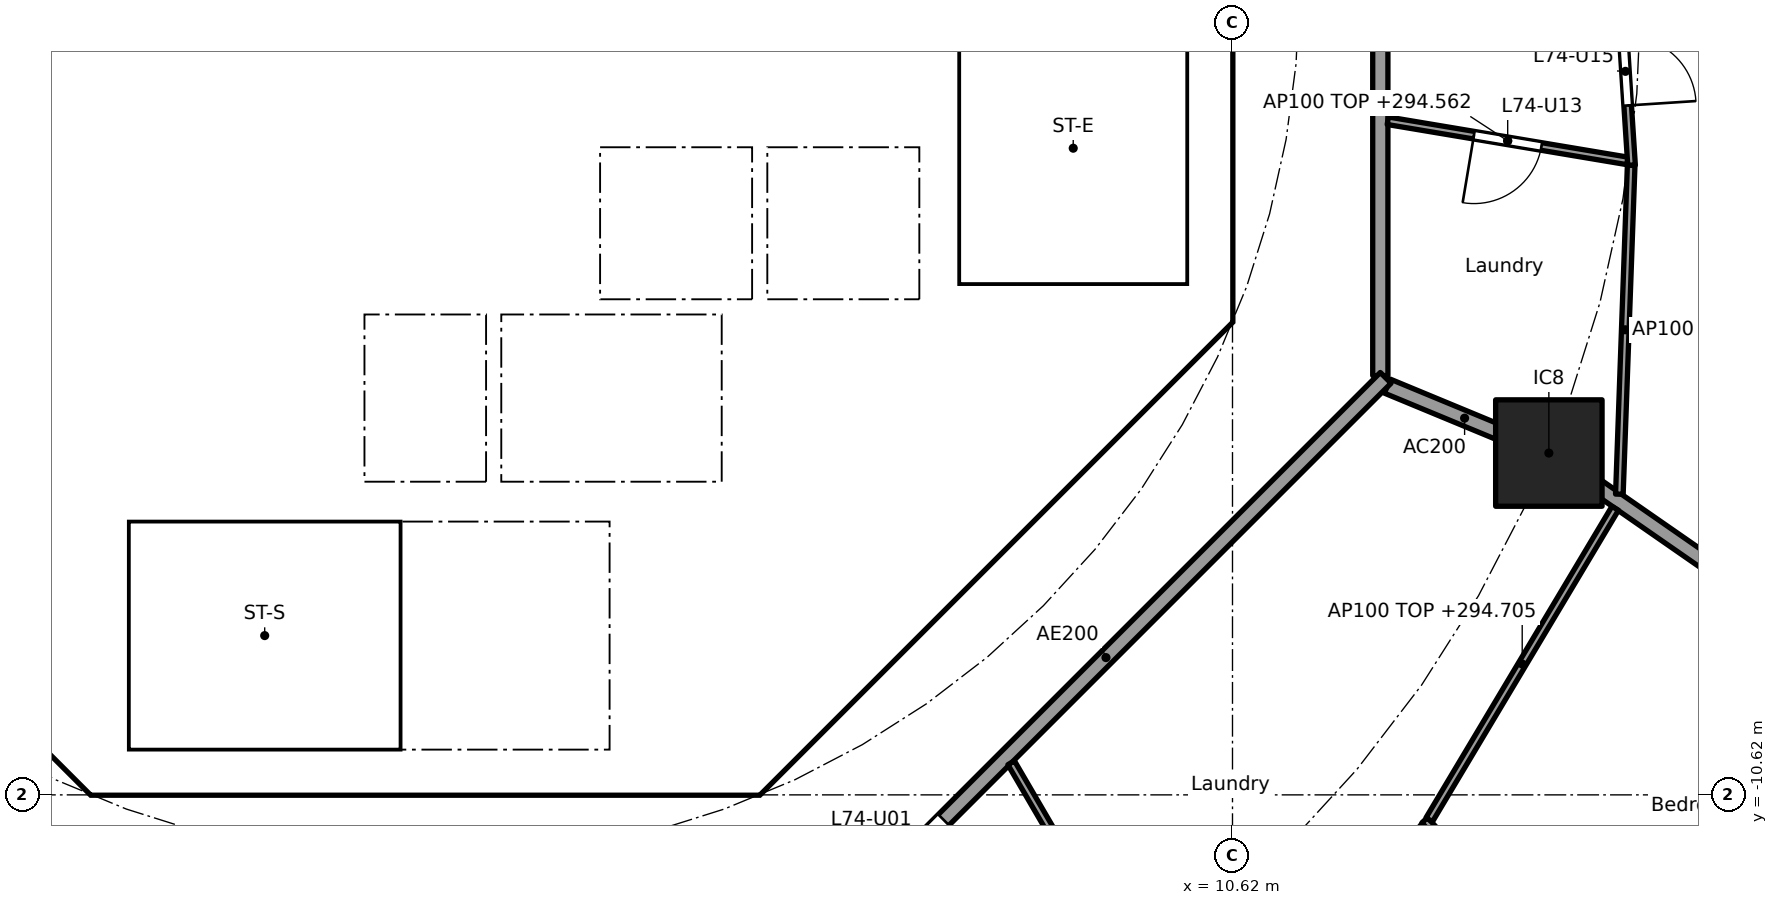
"""IFC4 building model, lengths in metres.
Left out: names, types, materials, properties, quantities, classifications, styles, units other than length and angle.
Written with IfcOpenShell. Run it as: python <this file> out.ifc"""

import sys

from ifc_helpers import new_model, si_unit, direction, frame, frame_2d, origin, origin_2d, place, context, subcontext, project, spatial, polyline, rectangle, outline, extrude, element, fill, save


model = new_model("IFC4")
c1 = context("Model", 3, precision=1e-05, world=origin(), true_north=direction((0.0, 1.0)))
c2 = subcontext(c1, "Body", "Model", "MODEL_VIEW")
j1 = project(units=[si_unit("LENGTHUNIT", "METRE"), si_unit("PLANEANGLEUNIT", "RADIAN")], contexts=[c1])
p1 = place(None, origin())
s1 = spatial("IfcSite", under=j1, at=p1, CompositionType="ELEMENT")
p2 = place(p1, origin())
s2 = spatial("IfcBuilding", under=s1, at=p2, CompositionType="ELEMENT")
p3 = place(p2, frame((0.0, 0.0, 291.8)))
s3 = spatial("IfcBuildingStorey", under=s2, at=p3, CompositionType="ELEMENT", Elevation=291.8)
p4 = place(p3, frame((14.782, -6.123, 0.0), z_axis=(0.0, 0.0, 1.0), x_axis=(1.0, 0.0, 0.0)))
e1 = element("IfcColumn", 1, at=p4, inside=s3, PredefinedType="COLUMN", context=c2, shape_type="SweptSolid", body=[
    extrude(rectangle(XDim=1.4, YDim=1.4, at=origin_2d()), origin(), (0.0, 0.0, 1.0), 3.7),
])
p5 = place(p3, frame((-9.988, -4.613, 0.0), z_axis=(0.0, 0.0, 1.0), x_axis=(0.707106781187, -0.707106781187, 0.0)))
e2 = element("IfcWall", 2, at=p5, inside=s3, PredefinedType="SHEAR", context=c2, shape_type="SweptSolid", body=[
    extrude(rectangle(XDim=7.602, YDim=0.6, at=frame_2d((3.801, 0.0))), origin(), (0.0, 0.0, 1.0), 3.44),
])
p6 = place(p5, frame((6.151, 0.0, 0.0)))
e3 = element("IfcOpeningElement", 3, at=p6, cuts=e2, PredefinedType="OPENING", context=c2, shape_type="SweptSolid", body=[
    extrude(rectangle(XDim=1.1, YDim=2.1, at=frame_2d((0.55, 1.05))), frame((0.0, 0.31, 0.0), z_axis=(0.0, -1.0, 0.0), x_axis=(1.0, 0.0, 0.0)), (0.0, 0.0, 1.0), 0.62),
])
p7 = place(p3, frame((4.613, -9.988, 0.0), z_axis=(0.0, 0.0, 1.0), x_axis=(0.707106781187, 0.707106781187, 0.0)))
e4 = element("IfcWall", 4, at=p7, inside=s3, PredefinedType="SHEAR", context=c2, shape_type="SweptSolid", body=[
    extrude(rectangle(XDim=7.602, YDim=0.6, at=frame_2d((3.801, 0.0))), origin(), (0.0, 0.0, 1.0), 3.44),
])
p8 = place(p7, frame((3.201, 0.0, 0.0)))
e5 = element("IfcOpeningElement", 5, at=p8, cuts=e4, PredefinedType="OPENING", context=c2, shape_type="SweptSolid", body=[
    extrude(rectangle(XDim=1.2, YDim=2.1, at=frame_2d((0.6, 1.05))), frame((0.0, 0.31, 0.0), z_axis=(0.0, -1.0, 0.0), x_axis=(1.0, 0.0, 0.0)), (0.0, 0.0, 1.0), 0.62),
])
p9 = place(p3, frame((4.0, -10.025, 0.0), z_axis=(0.0, 0.0, 1.0), x_axis=(0.0, 1.0, 0.0)))
e6 = element("IfcWall", 6, at=p9, inside=s3, PredefinedType="SOLIDWALL", context=c2, shape_type="SweptSolid", body=[
    extrude(rectangle(XDim=3.0, YDim=0.2, at=frame_2d((1.5, 0.0))), origin(), (0.0, 0.0, 1.0), 3.44),
])
p10 = place(p9, frame((0.975, 0.0, 0.0)))
e7 = element("IfcOpeningElement", 7, at=p10, cuts=e6, PredefinedType="OPENING", context=c2, shape_type="SweptSolid", body=[
    extrude(rectangle(XDim=1.1, YDim=2.1, at=frame_2d((0.55, 1.05))), frame((0.0, 0.11, 0.0), z_axis=(0.0, -1.0, 0.0), x_axis=(1.0, 0.0, 0.0)), (0.0, 0.0, 1.0), 0.22),
])
p11 = place(p3, frame((4.0, -6.5, 0.0), z_axis=(0.0, 0.0, 1.0), x_axis=(0.0, 1.0, 0.0)))
e8 = element("IfcWall", 8, at=p11, inside=s3, PredefinedType="SOLIDWALL", context=c2, shape_type="SweptSolid", body=[
    extrude(rectangle(XDim=2.2, YDim=0.2, at=frame_2d((1.1, 0.0))), origin(), (0.0, 0.0, 1.0), 3.44),
])
p12 = place(p11, frame((0.55, 0.0, 0.0)))
e9 = element("IfcOpeningElement", 9, at=p12, cuts=e8, PredefinedType="OPENING", context=c2, shape_type="SweptSolid", body=[
    extrude(rectangle(XDim=1.1, YDim=2.1, at=frame_2d((0.55, 1.05))), frame((0.0, 0.11, 0.0), z_axis=(0.0, -1.0, 0.0), x_axis=(1.0, 0.0, 0.0)), (0.0, 0.0, 1.0), 0.22),
])
p13 = place(p3, frame((-4.0, -6.5, 0.0), z_axis=(0.0, 0.0, 1.0), x_axis=(0.0, 1.0, 0.0)))
e10 = element("IfcWall", 10, at=p13, inside=s3, PredefinedType="SOLIDWALL", context=c2, shape_type="SweptSolid", body=[
    extrude(rectangle(XDim=2.2, YDim=0.2, at=frame_2d((1.1, 0.0))), origin(), (0.0, 0.0, 1.0), 3.44),
])
p14 = place(p13, frame((0.65, 0.0, 0.0)))
e11 = element("IfcOpeningElement", 11, at=p14, cuts=e10, PredefinedType="OPENING", context=c2, shape_type="SweptSolid", body=[
    extrude(rectangle(XDim=0.9, YDim=2.1, at=frame_2d((0.45, 1.05))), frame((0.0, 0.11, 0.0), z_axis=(0.0, -1.0, 0.0), x_axis=(1.0, 0.0, 0.0)), (0.0, 0.0, 1.0), 0.22),
])
p15 = place(p3, frame((-6.7, -2.0, 0.0), z_axis=(0.0, 0.0, 1.0), x_axis=(1.0, 0.0, 0.0)))
e12 = element("IfcWall", 12, at=p15, inside=s3, PredefinedType="SOLIDWALL", context=c2, shape_type="SweptSolid", body=[
    extrude(rectangle(XDim=13.4, YDim=0.2, at=frame_2d((6.7, 0.0))), origin(), (0.0, 0.0, 1.0), 3.44),
])
p16 = place(p15, frame((9.45, 0.0, 0.0)))
e13 = element("IfcOpeningElement", 13, at=p16, cuts=e12, PredefinedType="OPENING", context=c2, shape_type="SweptSolid", body=[
    extrude(rectangle(XDim=1.1, YDim=2.1, at=frame_2d((0.55, 1.05))), frame((0.0, 0.11, 0.0), z_axis=(0.0, -1.0, 0.0), x_axis=(1.0, 0.0, 0.0)), (0.0, 0.0, 1.0), 0.22),
])
p17 = place(p15, frame((11.65, 0.0, 0.0)))
e14 = element("IfcOpeningElement", 14, at=p17, cuts=e12, PredefinedType="OPENING", context=c2, shape_type="SweptSolid", body=[
    extrude(rectangle(XDim=1.1, YDim=2.1, at=frame_2d((0.55, 1.05))), frame((0.0, 0.11, 0.0), z_axis=(0.0, -1.0, 0.0), x_axis=(1.0, 0.0, 0.0)), (0.0, 0.0, 1.0), 0.22),
])
p18 = place(p15, frame((0.75, 0.0, 0.0)))
e15 = element("IfcOpeningElement", 15, at=p18, cuts=e12, PredefinedType="OPENING", context=c2, shape_type="SweptSolid", body=[
    extrude(rectangle(XDim=0.9, YDim=2.1, at=frame_2d((0.45, 1.05))), frame((0.0, 0.11, 0.0), z_axis=(0.0, -1.0, 0.0), x_axis=(1.0, 0.0, 0.0)), (0.0, 0.0, 1.0), 0.22),
])
p19 = place(p15, frame((2.95, 0.0, 0.0)))
e16 = element("IfcOpeningElement", 16, at=p19, cuts=e12, PredefinedType="OPENING", context=c2, shape_type="SweptSolid", body=[
    extrude(rectangle(XDim=0.9, YDim=2.1, at=frame_2d((0.45, 1.05))), frame((0.0, 0.11, 0.0), z_axis=(0.0, -1.0, 0.0), x_axis=(1.0, 0.0, 0.0)), (0.0, 0.0, 1.0), 0.22),
])
p20 = place(p15, frame((6.25, 0.0, 0.0)))
e17 = element("IfcOpeningElement", 17, at=p20, cuts=e12, PredefinedType="OPENING", context=c2, shape_type="SweptSolid", body=[
    extrude(rectangle(XDim=0.9, YDim=2.1, at=frame_2d((0.45, 1.05))), frame((0.0, 0.11, 0.0), z_axis=(0.0, -1.0, 0.0), x_axis=(1.0, 0.0, 0.0)), (0.0, 0.0, 1.0), 0.22),
])
p21 = place(p3, origin())
e18 = element("IfcWall", 18, at=p21, inside=s3, PredefinedType="SHEAR", context=c2, shape_type="SweptSolid", body=[
    extrude(outline(polyline([(-4.152, -10.025), (4.152, -10.025), (4.401, -9.776), (4.825, -10.2), (4.401, -10.625), (-4.401, -10.625), (-4.825, -10.2), (-4.401, -9.776), (-4.152, -10.025)])), origin(), (0.0, 0.0, 1.0), 3.44),
])
p22 = place(p3, origin())
e19 = element("IfcWall", 19, at=p22, inside=s3, PredefinedType="SHEAR", context=c2, shape_type="SweptSolid", body=[
    extrude(outline(polyline([(9.776, -4.401), (10.025, -4.152), (10.025, -3.801), (10.025, 4.152), (9.776, 4.401), (10.2, 4.825), (10.625, 4.401), (10.625, -4.401), (10.2, -4.825), (9.776, -4.401)])), origin(), (0.0, 0.0, 1.0), 3.44),
])
for number, where, z_axis, x_axis in (
    (20, (-0.9, -6.5, 0.0), (0.0, 0.0, 1.0), (0.0, 1.0, 0.0)),
    (21, (0.9, -6.5, 0.0), (0.0, 0.0, 1.0), (0.0, 1.0, 0.0)),
):
    element("IfcWall", number, at=place(p3, frame(where, z_axis=z_axis, x_axis=x_axis)), inside=s3, PredefinedType="SOLIDWALL", context=c2, shape_type="SweptSolid", body=[
        extrude(rectangle(XDim=2.2, YDim=0.2, at=frame_2d((1.1, 0.0))), origin(), (0.0, 0.0, 1.0), 3.44),
    ])
p23 = place(p3, origin())
e22 = element("IfcWall", 22, at=p23, inside=s3, PredefinedType="SOLIDWALL", context=c2, shape_type="SweptSolid", body=[
    extrude(outline(polyline([(-6.7, -2.1), (-6.5, -2.1), (-6.5, -4.1), (-4.5, -4.1), (-4.5, -2.1), (-4.3, -2.1), (-4.3, -4.1), (-2.3, -4.1), (-2.3, -2.1), (-2.1, -2.1), (-2.1, -4.1), (2.1, -4.1), (2.1, -2.1), (2.3, -2.1), (2.3, -4.1), (4.3, -4.1), (4.3, -2.1), (4.5, -2.1), (4.5, -4.1), (6.5, -4.1), (6.5, -2.1), (6.7, -2.1), (6.7, -4.3), (-6.7, -4.3), (-6.7, -2.1)])), origin(), (0.0, 0.0, 1.0), 3.44),
])
p24 = place(p3, origin())
e23 = element("IfcWall", 23, at=p24, inside=s3, PredefinedType="SOLIDWALL", context=c2, shape_type="SweptSolid", body=[
    extrude(outline(polyline([(-3.9, -10.025), (-4.1, -10.025), (-4.1, -7.025), (-3.9, -7.025), (-3.9, -10.025)])), origin(), (0.0, 0.0, 1.0), 3.44),
])
p25 = place(p3, origin())
e24 = element("IfcWall", 24, at=p25, inside=s3, PredefinedType="SOLIDWALL", context=c2, shape_type="SweptSolid", body=[
    extrude(outline(polyline([(4.1, -7.025), (-4.1, -7.025), (-4.1, -6.5), (4.1, -6.5), (4.1, -7.025)])), origin(), (0.0, 0.0, 1.0), 3.44),
])
p26 = place(p3, origin())
e25 = element("IfcWall", 25, at=p26, inside=s3, PredefinedType="SOLIDWALL", context=c2, shape_type="SweptSolid", body=[
    extrude(outline(polyline([(7.025, -3.9), (6.7, -3.9), (6.7, 3.9), (7.025, 3.9), (7.025, -3.9)])), origin(), (0.0, 0.0, 1.0), 3.44),
])
p27 = place(p3, origin())
e26 = element("IfcWall", 26, at=p27, inside=s3, PredefinedType="SOLIDWALL", context=c2, shape_type="SweptSolid", body=[
    extrude(outline(polyline([(10.025, -4.1), (6.7, -4.1), (6.7, -3.9), (10.025, -3.9), (10.025, -4.1)])), origin(), (0.0, 0.0, 1.0), 3.44),
])
p28 = place(p3, frame((12.657, -5.243, 0.0), z_axis=(0.0, 0.0, 1.0), x_axis=(0.92383017907, -0.382802560388, 0.0)))
e27 = element("IfcWall", 27, at=p28, inside=s3, PredefinedType="PARTITIONING", context=c2, shape_type="SweptSolid", body=[
    extrude(rectangle(XDim=2.2, YDim=0.2, at=frame_2d((1.1, 0.0))), origin(), (0.0, 0.0, 1.0), 3.44),
])
p29 = place(p3, frame((14.823, -6.151, 0.0), z_axis=(0.0, 0.0, 1.0), x_axis=(0.821435065081, -0.570302054928, 0.0)))
e28 = element("IfcWall", 28, at=p29, inside=s3, PredefinedType="PARTITIONING", context=c2, shape_type="SweptSolid", body=[
    extrude(rectangle(XDim=5.368, YDim=0.2, at=frame_2d((2.684, 0.0))), origin(), (0.0, 0.0, 1.0), 3.44),
])
p30 = place(p3, frame((12.565, -5.104, 0.0), z_axis=(0.0, 0.0, 1.0), x_axis=(0.0, 1.0, 0.0)))
e29 = element("IfcWall", 29, at=p30, inside=s3, PredefinedType="PARTITIONING", context=c2, shape_type="SweptSolid", body=[
    extrude(rectangle(XDim=10.209, YDim=0.2, at=frame_2d((5.104, 0.0))), origin(), (0.0, 0.0, 1.0), 3.44),
])
p31 = place(p30, frame((4.604, 0.0, 0.0)))
e30 = element("IfcOpeningElement", 30, at=p31, cuts=e29, PredefinedType="OPENING", context=c2, shape_type="SweptSolid", body=[
    extrude(rectangle(XDim=1.0, YDim=2.1, at=frame_2d((0.5, 1.05))), frame((0.0, 0.11, 0.0), z_axis=(0.0, -1.0, 0.0), x_axis=(1.0, 0.0, 0.0)), (0.0, 0.0, 1.0), 0.22),
])
p32 = place(p3, frame((5.275, -12.494, 0.0), z_axis=(0.0, 0.0, 1.0), x_axis=(0.707106781187, 0.707106781187, 0.0)))
e31 = element("IfcWall", 31, at=p32, inside=s3, PredefinedType="PARTITIONING", context=c2, shape_type="SweptSolid", body=[
    extrude(rectangle(XDim=10.409, YDim=0.2, at=frame_2d((5.205, 0.0))), origin(), (0.0, 0.0, 1.0), 3.44),
])
p33 = place(p32, frame((1.185, 0.0, 0.0)))
e32 = element("IfcOpeningElement", 32, at=p33, cuts=e31, PredefinedType="OPENING", context=c2, shape_type="SweptSolid", body=[
    extrude(rectangle(XDim=1.0, YDim=2.1, at=frame_2d((0.5, 1.05))), frame((0.0, 0.11, 0.0), z_axis=(0.0, -1.0, 0.0), x_axis=(1.0, 0.0, 0.0)), (0.0, 0.0, 1.0), 0.22),
])
p34 = place(p3, frame((12.663, -1.751, 0.0), z_axis=(0.0, 0.0, 1.0), x_axis=(0.98626156497, -0.165191178529, 0.0)))
e33 = element("IfcWall", 33, at=p34, inside=s3, PredefinedType="PARTITIONING", context=c2, shape_type="SweptSolid", body=[
    extrude(rectangle(XDim=3.198, YDim=0.1, at=frame_2d((1.599, 0.0))), origin(), (0.0, 0.0, 1.0), 2.762),
])
p35 = place(p34, frame((1.149, 0.0, 0.0)))
e34 = element("IfcOpeningElement", 34, at=p35, cuts=e33, PredefinedType="OPENING", context=c2, shape_type="SweptSolid", body=[
    extrude(rectangle(XDim=0.9, YDim=2.1, at=frame_2d((0.45, 1.05))), frame((0.0, 0.06, 0.0), z_axis=(0.0, -1.0, 0.0), x_axis=(1.0, 0.0, 0.0)), (0.0, 0.0, 1.0), 0.12),
])
p36 = place(p3, frame((15.87, -2.338, 0.0), z_axis=(0.0, 0.0, 1.0), x_axis=(-0.064797294757, 0.997898447034, 0.0)))
e35 = element("IfcWall", 35, at=p36, inside=s3, PredefinedType="PARTITIONING", context=c2, shape_type="SweptSolid", body=[
    extrude(rectangle(XDim=4.857, YDim=0.1, at=frame_2d((2.428, 0.0))), origin(), (0.0, 0.0, 1.0), 3.44),
])
p37 = place(p36, frame((0.789, 0.0, 0.0)))
e36 = element("IfcOpeningElement", 36, at=p37, cuts=e35, PredefinedType="OPENING", context=c2, shape_type="SweptSolid", body=[
    extrude(rectangle(XDim=0.9, YDim=2.1, at=frame_2d((0.45, 1.05))), frame((0.0, 0.06, 0.0), z_axis=(0.0, -1.0, 0.0), x_axis=(1.0, 0.0, 0.0)), (0.0, 0.0, 1.0), 0.12),
])
p38 = place(p36, frame((3.167, 0.0, 0.0)))
e37 = element("IfcOpeningElement", 37, at=p38, cuts=e35, PredefinedType="OPENING", context=c2, shape_type="SweptSolid", body=[
    extrude(rectangle(XDim=0.9, YDim=2.1, at=frame_2d((0.45, 1.05))), frame((0.0, 0.06, 0.0), z_axis=(0.0, -1.0, 0.0), x_axis=(1.0, 0.0, 0.0)), (0.0, 0.0, 1.0), 0.12),
])
p39 = place(p3, frame((15.865, -2.338, 0.0), z_axis=(0.0, 0.0, 1.0), x_axis=(-0.035864509465, -0.999356661538, 0.0)))
e38 = element("IfcWall", 38, at=p39, inside=s3, PredefinedType="PARTITIONING", context=c2, shape_type="SweptSolid", body=[
    extrude(rectangle(XDim=4.329, YDim=0.1, at=frame_2d((2.165, 0.0))), origin(), (0.0, 0.0, 1.0), 2.905),
])
p40 = place(p3, frame((7.708, -10.198, 0.0), z_axis=(0.0, 0.0, 1.0), x_axis=(0.503839015963, -0.863797572347, 0.0)))
e39 = element("IfcWall", 39, at=p40, inside=s3, PredefinedType="PARTITIONING", context=c2, shape_type="SweptSolid", body=[
    extrude(rectangle(XDim=11.856, YDim=0.1, at=frame_2d((5.928, 0.0))), origin(), (0.0, 0.0, 1.0), 2.762),
])
p41 = place(p40, frame((2.095, 0.0, 0.0)))
e40 = element("IfcOpeningElement", 40, at=p41, cuts=e39, PredefinedType="OPENING", context=c2, shape_type="SweptSolid", body=[
    extrude(rectangle(XDim=0.9, YDim=2.1, at=frame_2d((0.45, 1.05))), frame((0.0, 0.06, 0.0), z_axis=(0.0, -1.0, 0.0), x_axis=(1.0, 0.0, 0.0)), (0.0, 0.0, 1.0), 0.12),
])
p42 = place(p40, frame((8.023, 0.0, 0.0)))
e41 = element("IfcOpeningElement", 41, at=p42, cuts=e39, PredefinedType="OPENING", context=c2, shape_type="SweptSolid", body=[
    extrude(rectangle(XDim=0.9, YDim=2.1, at=frame_2d((0.45, 1.05))), frame((0.0, 0.06, 0.0), z_axis=(0.0, -1.0, 0.0), x_axis=(1.0, 0.0, 0.0)), (0.0, 0.0, 1.0), 0.12),
])
p43 = place(p3, frame((10.304, -14.555, 0.0), z_axis=(0.0, 0.0, 1.0), x_axis=(0.628170338674, 0.778075848237, 0.0)))
e42 = element("IfcWall", 42, at=p43, inside=s3, PredefinedType="PARTITIONING", context=c2, shape_type="SweptSolid", body=[
    extrude(rectangle(XDim=4.532, YDim=0.1, at=frame_2d((2.266, 0.0))), origin(), (0.0, 0.0, 1.0), 2.905),
])
p44 = place(p3, frame((13.149, -10.953, 0.0), z_axis=(0.0, 0.0, 1.0), x_axis=(0.677762562884, -0.735280836384, 0.0)))
e43 = element("IfcWall", 43, at=p44, inside=s3, PredefinedType="PARTITIONING", context=c2, shape_type="SweptSolid", body=[
    extrude(rectangle(XDim=5.841, YDim=0.1, at=frame_2d((2.92, 0.0))), origin(), (0.0, 0.0, 1.0), 3.44),
])
p45 = place(p44, frame((2.495, 0.0, 0.0)))
e44 = element("IfcOpeningElement", 44, at=p45, cuts=e43, PredefinedType="OPENING", context=c2, shape_type="SweptSolid", body=[
    extrude(rectangle(XDim=0.9, YDim=2.1, at=frame_2d((0.45, 1.05))), frame((0.0, 0.06, 0.0), z_axis=(0.0, -1.0, 0.0), x_axis=(1.0, 0.0, 0.0)), (0.0, 0.0, 1.0), 0.12),
])
p46 = place(p3, frame((13.208, -10.947, 0.0), z_axis=(0.0, 0.0, 1.0), x_axis=(0.512726452516, 0.858552028063, 0.0)))
e45 = element("IfcWall", 45, at=p46, inside=s3, PredefinedType="PARTITIONING", context=c2, shape_type="SweptSolid", body=[
    extrude(rectangle(XDim=4.772, YDim=0.1, at=frame_2d((2.386, 0.0))), origin(), (0.0, 0.0, 1.0), 2.905),
])
p47 = place(p16, origin())
e46 = element("IfcDoor", 46, at=p47, inside=s3, OperationType="DOUBLE_DOOR_SLIDING", PredefinedType="DOOR", context=c2, shape_type="SweptSolid", body=[
    extrude(rectangle(XDim=1.1, YDim=2.1, at=frame_2d((0.55, 1.05))), frame((0.0, 0.025, 0.0), z_axis=(0.0, -1.0, 0.0), x_axis=(1.0, 0.0, 0.0)), (0.0, 0.0, 1.0), 0.05),
])
fill(e13, e46)
p48 = place(p17, origin())
e47 = element("IfcDoor", 47, at=p48, inside=s3, OperationType="DOUBLE_DOOR_SLIDING", PredefinedType="DOOR", context=c2, shape_type="SweptSolid", body=[
    extrude(rectangle(XDim=1.1, YDim=2.1, at=frame_2d((0.55, 1.05))), frame((0.0, 0.025, 0.0), z_axis=(0.0, -1.0, 0.0), x_axis=(1.0, 0.0, 0.0)), (0.0, 0.0, 1.0), 0.05),
])
fill(e14, e47)
p49 = place(p12, origin())
e48 = element("IfcDoor", 48, at=p49, inside=s3, OperationType="DOUBLE_DOOR_SLIDING", PredefinedType="DOOR", context=c2, shape_type="SweptSolid", body=[
    extrude(rectangle(XDim=1.1, YDim=2.1, at=frame_2d((0.55, 1.05))), frame((0.0, 0.025, 0.0), z_axis=(0.0, -1.0, 0.0), x_axis=(1.0, 0.0, 0.0)), (0.0, 0.0, 1.0), 0.05),
])
fill(e9, e48)
p50 = place(p10, origin())
e49 = element("IfcDoor", 49, at=p50, inside=s3, OperationType="SINGLE_SWING_RIGHT", PredefinedType="DOOR", context=c2, shape_type="SweptSolid", body=[
    extrude(rectangle(XDim=1.1, YDim=2.1, at=frame_2d((0.55, 1.05))), frame((0.0, 0.025, 0.0), z_axis=(0.0, -1.0, 0.0), x_axis=(1.0, 0.0, 0.0)), (0.0, 0.0, 1.0), 0.05),
])
fill(e7, e49)
p51 = place(p14, frame((0.9, 0.0, 0.0), x_axis=(-1.0, 0.0, 0.0)))
e50 = element("IfcDoor", 50, at=p51, inside=s3, OperationType="SINGLE_SWING_LEFT", PredefinedType="DOOR", context=c2, shape_type="SweptSolid", body=[
    extrude(rectangle(XDim=0.9, YDim=2.1, at=frame_2d((0.45, 1.05))), frame((0.0, 0.025, 0.0), z_axis=(0.0, -1.0, 0.0), x_axis=(1.0, 0.0, 0.0)), (0.0, 0.0, 1.0), 0.05),
])
fill(e11, e50)
p52 = place(p19, frame((0.9, 0.0, 0.0), x_axis=(-1.0, 0.0, 0.0)))
e51 = element("IfcDoor", 51, at=p52, inside=s3, OperationType="SINGLE_SWING_RIGHT", PredefinedType="DOOR", context=c2, shape_type="SweptSolid", body=[
    extrude(rectangle(XDim=0.9, YDim=2.1, at=frame_2d((0.45, 1.05))), frame((0.0, 0.025, 0.0), z_axis=(0.0, -1.0, 0.0), x_axis=(1.0, 0.0, 0.0)), (0.0, 0.0, 1.0), 0.05),
])
fill(e16, e51)
p53 = place(p20, frame((0.9, 0.0, 0.0), x_axis=(-1.0, 0.0, 0.0)))
e52 = element("IfcDoor", 52, at=p53, inside=s3, OperationType="SINGLE_SWING_RIGHT", PredefinedType="DOOR", context=c2, shape_type="SweptSolid", body=[
    extrude(rectangle(XDim=0.9, YDim=2.1, at=frame_2d((0.45, 1.05))), frame((0.0, 0.025, 0.0), z_axis=(0.0, -1.0, 0.0), x_axis=(1.0, 0.0, 0.0)), (0.0, 0.0, 1.0), 0.05),
])
fill(e17, e52)
p54 = place(p8, origin())
e53 = element("IfcDoor", 53, at=p54, inside=s3, OperationType="SINGLE_SWING_RIGHT", PredefinedType="DOOR", context=c2, shape_type="SweptSolid", body=[
    extrude(rectangle(XDim=1.2, YDim=2.1, at=frame_2d((0.6, 1.05))), frame((0.0, 0.025, 0.0), z_axis=(0.0, -1.0, 0.0), x_axis=(1.0, 0.0, 0.0)), (0.0, 0.0, 1.0), 0.05),
])
fill(e5, e53)
p55 = place(p6, origin())
e54 = element("IfcDoor", 54, at=p55, inside=s3, OperationType="SINGLE_SWING_RIGHT", PredefinedType="DOOR", context=c2, shape_type="SweptSolid", body=[
    extrude(rectangle(XDim=1.1, YDim=2.1, at=frame_2d((0.55, 1.05))), frame((0.0, 0.025, 0.0), z_axis=(0.0, -1.0, 0.0), x_axis=(1.0, 0.0, 0.0)), (0.0, 0.0, 1.0), 0.05),
])
fill(e3, e54)
p56 = place(p33, frame((1.0, 0.0, 0.0), x_axis=(-1.0, 0.0, 0.0)))
e55 = element("IfcDoor", 55, at=p56, inside=s3, OperationType="SINGLE_SWING_RIGHT", PredefinedType="DOOR", context=c2, shape_type="SweptSolid", body=[
    extrude(rectangle(XDim=1.0, YDim=2.1, at=frame_2d((0.5, 1.05))), frame((0.0, 0.025, 0.0), z_axis=(0.0, -1.0, 0.0), x_axis=(1.0, 0.0, 0.0)), (0.0, 0.0, 1.0), 0.05),
])
fill(e32, e55)
p57 = place(p35, frame((0.9, 0.0, 0.0), x_axis=(-1.0, 0.0, 0.0)))
e56 = element("IfcDoor", 56, at=p57, inside=s3, OperationType="SINGLE_SWING_RIGHT", PredefinedType="DOOR", context=c2, shape_type="SweptSolid", body=[
    extrude(rectangle(XDim=0.9, YDim=2.1, at=frame_2d((0.45, 1.05))), frame((0.0, 0.025, 0.0), z_axis=(0.0, -1.0, 0.0), x_axis=(1.0, 0.0, 0.0)), (0.0, 0.0, 1.0), 0.05),
])
fill(e34, e56)
p58 = place(p37, frame((0.9, 0.0, 0.0), x_axis=(-1.0, 0.0, 0.0)))
e57 = element("IfcDoor", 57, at=p58, inside=s3, OperationType="SINGLE_SWING_RIGHT", PredefinedType="DOOR", context=c2, shape_type="SweptSolid", body=[
    extrude(rectangle(XDim=0.9, YDim=2.1, at=frame_2d((0.45, 1.05))), frame((0.0, 0.025, 0.0), z_axis=(0.0, -1.0, 0.0), x_axis=(1.0, 0.0, 0.0)), (0.0, 0.0, 1.0), 0.05),
])
fill(e36, e57)
save(model, sys.argv[1])
